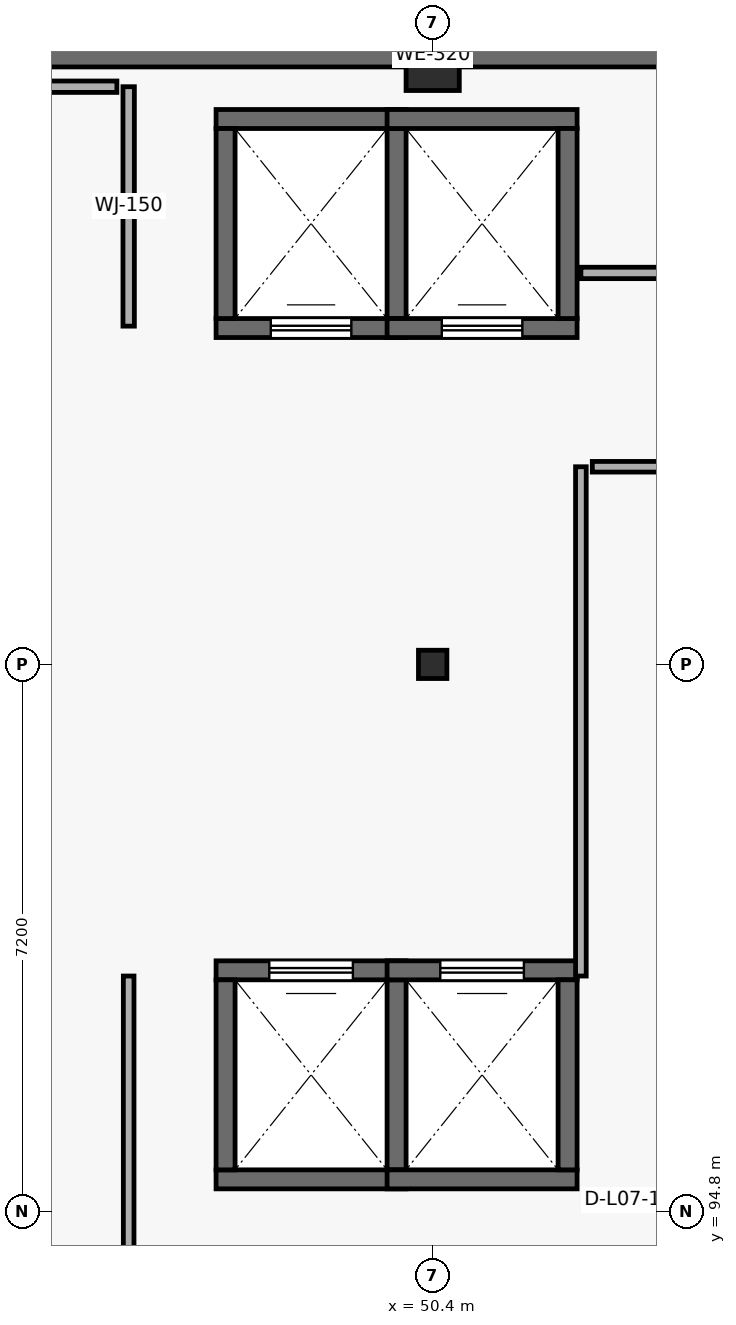
"""IFC4 building model, lengths in metres.
Left out: names, types, materials, properties, quantities, classifications, styles, units other than length and angle.
Written with IfcOpenShell. Run it as: python <this file> out.ifc"""

import sys

from ifc_helpers import new_model, si_unit, direction, frame, frame_2d, origin, origin_2d, place, context, subcontext, project, spatial, rectangle, i_section, extrude, element, fill, save


model = new_model("IFC4")
c1 = context("Model", 3, precision=1e-05, world=origin(), true_north=direction((0.0, 1.0)))
c2 = subcontext(c1, "Body", "Model", "MODEL_VIEW")
j1 = project(units=[si_unit("LENGTHUNIT", "METRE"), si_unit("PLANEANGLEUNIT", "RADIAN")], contexts=[c1])
p1 = place(None, origin())
s1 = spatial("IfcSite", under=j1, at=p1, CompositionType="ELEMENT")
p2 = place(p1, origin())
s2 = spatial("IfcBuilding", under=s1, at=p2, CompositionType="ELEMENT")
p3 = place(p2, frame((0.0, 0.0, 30.6)))
s3 = spatial("IfcBuildingStorey", under=s2, at=p3, CompositionType="ELEMENT", Elevation=30.6)
p4 = place(p3, frame((50.4, 102.0, 0.0), z_axis=(0.0, 0.0, 1.0), x_axis=(1.0, 0.0, 0.0)))
e1 = element("IfcColumn", 1, at=p4, inside=s3, PredefinedType="COLUMN", context=c2, shape_type="SweptSolid", body=[
    extrude(i_section(OverallWidth=0.374, OverallDepth=0.372, WebThickness=0.016, FlangeThickness=0.026, at=origin_2d()), origin(), (0.0, 0.0, 1.0), 5.1),
])
p5 = place(p3, frame((50.4, 109.9, 0.0), z_axis=(0.0, 0.0, 1.0), x_axis=(1.0, 0.0, 0.0)))
e2 = element("IfcColumn", 2, at=p5, inside=s3, PredefinedType="COLUMN", context=c2, shape_type="SweptSolid", body=[
    extrude(rectangle(XDim=0.7, YDim=0.7, at=origin_2d()), origin(), (0.0, 0.0, 1.0), 5.1),
])
p6 = place(p3, frame((33.6, 110.02, 0.0), z_axis=(0.0, 0.0, 1.0), x_axis=(1.0, 0.0, 0.0)))
e3 = element("IfcWall", 3, at=p6, inside=s3, PredefinedType="SOLIDWALL", context=c2, shape_type="SweptSolid", body=[
    extrude(rectangle(XDim=33.6, YDim=0.32, at=frame_2d((16.8, 0.0))), origin(), (0.0, 0.0, 1.0), 4.84),
])
p7 = place(p3, frame((47.55, 95.225, 0.0), z_axis=(0.0, 0.0, 1.0), x_axis=(1.0, 0.0, 0.0)))
e4 = element("IfcWall", 4, at=p7, inside=s3, PredefinedType="SHEAR", context=c2, shape_type="SweptSolid", body=[
    extrude(rectangle(XDim=2.5, YDim=0.25, at=frame_2d((1.25, 0.0))), origin(), (0.0, 0.0, 1.0), 4.84),
])
p8 = place(p3, frame((50.05, 97.975, 0.0), z_axis=(0.0, 0.0, 1.0), x_axis=(-1.0, 0.0, 0.0)))
e5 = element("IfcWall", 5, at=p8, inside=s3, PredefinedType="SHEAR", context=c2, shape_type="SweptSolid", body=[
    extrude(rectangle(XDim=2.5, YDim=0.25, at=frame_2d((1.25, 0.0))), origin(), (0.0, 0.0, 1.0), 4.84),
])
p9 = place(p8, frame((0.7, 0.0, 0.0)))
e6 = element("IfcOpeningElement", 6, at=p9, cuts=e5, PredefinedType="OPENING", context=c2, shape_type="SweptSolid", body=[
    extrude(rectangle(XDim=1.1, YDim=2.2, at=frame_2d((0.55, 1.1))), frame((0.0, 0.135, 0.0), z_axis=(0.0, -1.0, 0.0), x_axis=(1.0, 0.0, 0.0)), (0.0, 0.0, 1.0), 0.27),
])
for number, where, z_axis, x_axis in (
    (7, (47.675, 95.35, 0.0), (0.0, 0.0, 1.0), (0.0, 1.0, 0.0)),
    (8, (49.925, 97.85, 0.0), (0.0, 0.0, 1.0), (0.0, -1.0, 0.0)),
    (9, (49.8, 95.225, 0.0), (0.0, 0.0, 1.0), (1.0, 0.0, 0.0)),
):
    element("IfcWall", number, at=place(p3, frame(where, z_axis=z_axis, x_axis=x_axis)), inside=s3, PredefinedType="SHEAR", context=c2, shape_type="SweptSolid", body=[
        extrude(rectangle(XDim=2.5, YDim=0.25, at=frame_2d((1.25, 0.0))), origin(), (0.0, 0.0, 1.0), 4.84),
    ])
p10 = place(p3, frame((52.3, 97.975, 0.0), z_axis=(0.0, 0.0, 1.0), x_axis=(-1.0, 0.0, 0.0)))
e10 = element("IfcWall", 10, at=p10, inside=s3, PredefinedType="SHEAR", context=c2, shape_type="SweptSolid", body=[
    extrude(rectangle(XDim=2.5, YDim=0.25, at=frame_2d((1.25, 0.0))), origin(), (0.0, 0.0, 1.0), 4.84),
])
p11 = place(p10, frame((0.7, 0.0, 0.0)))
e11 = element("IfcOpeningElement", 11, at=p11, cuts=e10, PredefinedType="OPENING", context=c2, shape_type="SweptSolid", body=[
    extrude(rectangle(XDim=1.1, YDim=2.2, at=frame_2d((0.55, 1.1))), frame((0.0, 0.135, 0.0), z_axis=(0.0, -1.0, 0.0), x_axis=(1.0, 0.0, 0.0)), (0.0, 0.0, 1.0), 0.27),
])
p12 = place(p3, frame((52.175, 97.85, 0.0), z_axis=(0.0, 0.0, 1.0), x_axis=(0.0, -1.0, 0.0)))
e12 = element("IfcWall", 12, at=p12, inside=s3, PredefinedType="SHEAR", context=c2, shape_type="SweptSolid", body=[
    extrude(rectangle(XDim=2.5, YDim=0.25, at=frame_2d((1.25, 0.0))), origin(), (0.0, 0.0, 1.0), 4.84),
])
p13 = place(p3, frame((47.55, 106.425, 0.0), z_axis=(0.0, 0.0, 1.0), x_axis=(1.0, 0.0, 0.0)))
e13 = element("IfcWall", 13, at=p13, inside=s3, PredefinedType="SHEAR", context=c2, shape_type="SweptSolid", body=[
    extrude(rectangle(XDim=2.5, YDim=0.25, at=frame_2d((1.25, 0.0))), origin(), (0.0, 0.0, 1.0), 4.84),
])
p14 = place(p13, frame((0.72, 0.0, 0.0)))
e14 = element("IfcOpeningElement", 14, at=p14, cuts=e13, PredefinedType="OPENING", context=c2, shape_type="SweptSolid", body=[
    extrude(rectangle(XDim=1.06, YDim=2.2, at=frame_2d((0.53, 1.1))), frame((0.0, 0.135, 0.0), z_axis=(0.0, -1.0, 0.0), x_axis=(1.0, 0.0, 0.0)), (0.0, 0.0, 1.0), 0.27),
])
for number, where, z_axis, x_axis in (
    (15, (50.05, 109.175, 0.0), (0.0, 0.0, 1.0), (-1.0, 0.0, 0.0)),
    (16, (47.675, 106.55, 0.0), (0.0, 0.0, 1.0), (0.0, 1.0, 0.0)),
    (17, (49.925, 109.05, 0.0), (0.0, 0.0, 1.0), (0.0, -1.0, 0.0)),
):
    element("IfcWall", number, at=place(p3, frame(where, z_axis=z_axis, x_axis=x_axis)), inside=s3, PredefinedType="SHEAR", context=c2, shape_type="SweptSolid", body=[
        extrude(rectangle(XDim=2.5, YDim=0.25, at=frame_2d((1.25, 0.0))), origin(), (0.0, 0.0, 1.0), 4.84),
    ])
p15 = place(p3, frame((49.8, 106.425, 0.0), z_axis=(0.0, 0.0, 1.0), x_axis=(1.0, 0.0, 0.0)))
e18 = element("IfcWall", 18, at=p15, inside=s3, PredefinedType="SHEAR", context=c2, shape_type="SweptSolid", body=[
    extrude(rectangle(XDim=2.5, YDim=0.25, at=frame_2d((1.25, 0.0))), origin(), (0.0, 0.0, 1.0), 4.84),
])
p16 = place(p15, frame((0.72, 0.0, 0.0)))
e19 = element("IfcOpeningElement", 19, at=p16, cuts=e18, PredefinedType="OPENING", context=c2, shape_type="SweptSolid", body=[
    extrude(rectangle(XDim=1.06, YDim=2.2, at=frame_2d((0.53, 1.1))), frame((0.0, 0.135, 0.0), z_axis=(0.0, -1.0, 0.0), x_axis=(1.0, 0.0, 0.0)), (0.0, 0.0, 1.0), 0.27),
])
for number, where, z_axis, x_axis in (
    (20, (52.3, 109.175, 0.0), (0.0, 0.0, 1.0), (-1.0, 0.0, 0.0)),
    (21, (52.175, 109.05, 0.0), (0.0, 0.0, 1.0), (0.0, -1.0, 0.0)),
):
    element("IfcWall", number, at=place(p3, frame(where, z_axis=z_axis, x_axis=x_axis)), inside=s3, PredefinedType="SHEAR", context=c2, shape_type="SweptSolid", body=[
        extrude(rectangle(XDim=2.5, YDim=0.25, at=frame_2d((1.25, 0.0))), origin(), (0.0, 0.0, 1.0), 4.84),
    ])
p17 = place(p3, frame((63.11, 107.15, 0.0), z_axis=(0.0, 0.0, 1.0), x_axis=(-1.0, 0.0, 0.0)))
e22 = element("IfcWall", 22, at=p17, inside=s3, PredefinedType="PARTITIONING", context=c2, shape_type="SweptSolid", body=[
    extrude(rectangle(XDim=10.76, YDim=0.15, at=frame_2d((5.38, 0.0))), origin(), (0.0, 0.0, 1.0), 4.84),
])
p18 = place(p3, frame((52.35, 97.9, 0.0), z_axis=(0.0, 0.0, 1.0), x_axis=(0.0, 1.0, 0.0)))
e23 = element("IfcWall", 23, at=p18, inside=s3, PredefinedType="PARTITIONING", context=c2, shape_type="SweptSolid", body=[
    extrude(rectangle(XDim=6.7, YDim=0.14, at=frame_2d((3.35, 0.0))), origin(), (0.0, 0.0, 1.0), 4.84),
])
p19 = place(p3, frame((46.4, 94.0, 0.0), z_axis=(0.0, 0.0, 1.0), x_axis=(0.0, 1.0, 0.0)))
e24 = element("IfcWall", 24, at=p19, inside=s3, PredefinedType="PARTITIONING", context=c2, shape_type="SweptSolid", body=[
    extrude(rectangle(XDim=3.9, YDim=0.14, at=frame_2d((1.95, 0.0))), origin(), (0.0, 0.0, 1.0), 4.84),
])
p20 = place(p3, frame((46.4, 106.45, 0.0), z_axis=(0.0, 0.0, 1.0), x_axis=(0.0, 1.0, 0.0)))
e25 = element("IfcWall", 25, at=p20, inside=s3, PredefinedType="PARTITIONING", context=c2, shape_type="SweptSolid", body=[
    extrude(rectangle(XDim=3.15, YDim=0.15, at=frame_2d((1.575, 0.0))), origin(), (0.0, 0.0, 1.0), 4.84),
])
p21 = place(p3, frame((52.5, 104.6, 0.0), z_axis=(0.0, 0.0, 1.0), x_axis=(1.0, 0.0, 0.0)))
e26 = element("IfcWall", 26, at=p21, inside=s3, PredefinedType="PARTITIONING", context=c2, shape_type="SweptSolid", body=[
    extrude(rectangle(XDim=2.58, YDim=0.14, at=frame_2d((1.29, 0.0))), origin(), (0.0, 0.0, 1.0), 4.84),
])
p22 = place(p3, frame((46.245, 109.6, 0.0), z_axis=(0.0, 0.0, 1.0), x_axis=(-1.0, 0.0, 0.0)))
e27 = element("IfcWall", 27, at=p22, inside=s3, PredefinedType="PARTITIONING", context=c2, shape_type="SweptSolid", body=[
    extrude(rectangle(XDim=1.91, YDim=0.15, at=frame_2d((0.955, 0.0))), origin(), (0.0, 0.0, 1.0), 3.9),
])
p23 = place(p9, origin())
e28 = element("IfcDoor", 28, at=p23, inside=s3, OperationType="SLIDING_TO_RIGHT", PredefinedType="DOOR", context=c2, shape_type="SweptSolid", body=[
    extrude(rectangle(XDim=1.1, YDim=2.2, at=frame_2d((0.55, 1.1))), frame((0.0, 0.025, 0.0), z_axis=(0.0, -1.0, 0.0), x_axis=(1.0, 0.0, 0.0)), (0.0, 0.0, 1.0), 0.05),
])
fill(e6, e28)
p24 = place(p11, origin())
e29 = element("IfcDoor", 29, at=p24, inside=s3, OperationType="SLIDING_TO_RIGHT", PredefinedType="DOOR", context=c2, shape_type="SweptSolid", body=[
    extrude(rectangle(XDim=1.1, YDim=2.2, at=frame_2d((0.55, 1.1))), frame((0.0, 0.025, 0.0), z_axis=(0.0, -1.0, 0.0), x_axis=(1.0, 0.0, 0.0)), (0.0, 0.0, 1.0), 0.05),
])
fill(e11, e29)
p25 = place(p14, origin())
e30 = element("IfcDoor", 30, at=p25, inside=s3, OperationType="SLIDING_TO_RIGHT", PredefinedType="DOOR", context=c2, shape_type="SweptSolid", body=[
    extrude(rectangle(XDim=1.06, YDim=2.2, at=frame_2d((0.53, 1.1))), frame((0.0, 0.025, 0.0), z_axis=(0.0, -1.0, 0.0), x_axis=(1.0, 0.0, 0.0)), (0.0, 0.0, 1.0), 0.05),
])
fill(e14, e30)
p26 = place(p16, origin())
e31 = element("IfcDoor", 31, at=p26, inside=s3, OperationType="SLIDING_TO_RIGHT", PredefinedType="DOOR", context=c2, shape_type="SweptSolid", body=[
    extrude(rectangle(XDim=1.06, YDim=2.2, at=frame_2d((0.53, 1.1))), frame((0.0, 0.025, 0.0), z_axis=(0.0, -1.0, 0.0), x_axis=(1.0, 0.0, 0.0)), (0.0, 0.0, 1.0), 0.05),
])
fill(e19, e31)
save(model, sys.argv[1])
